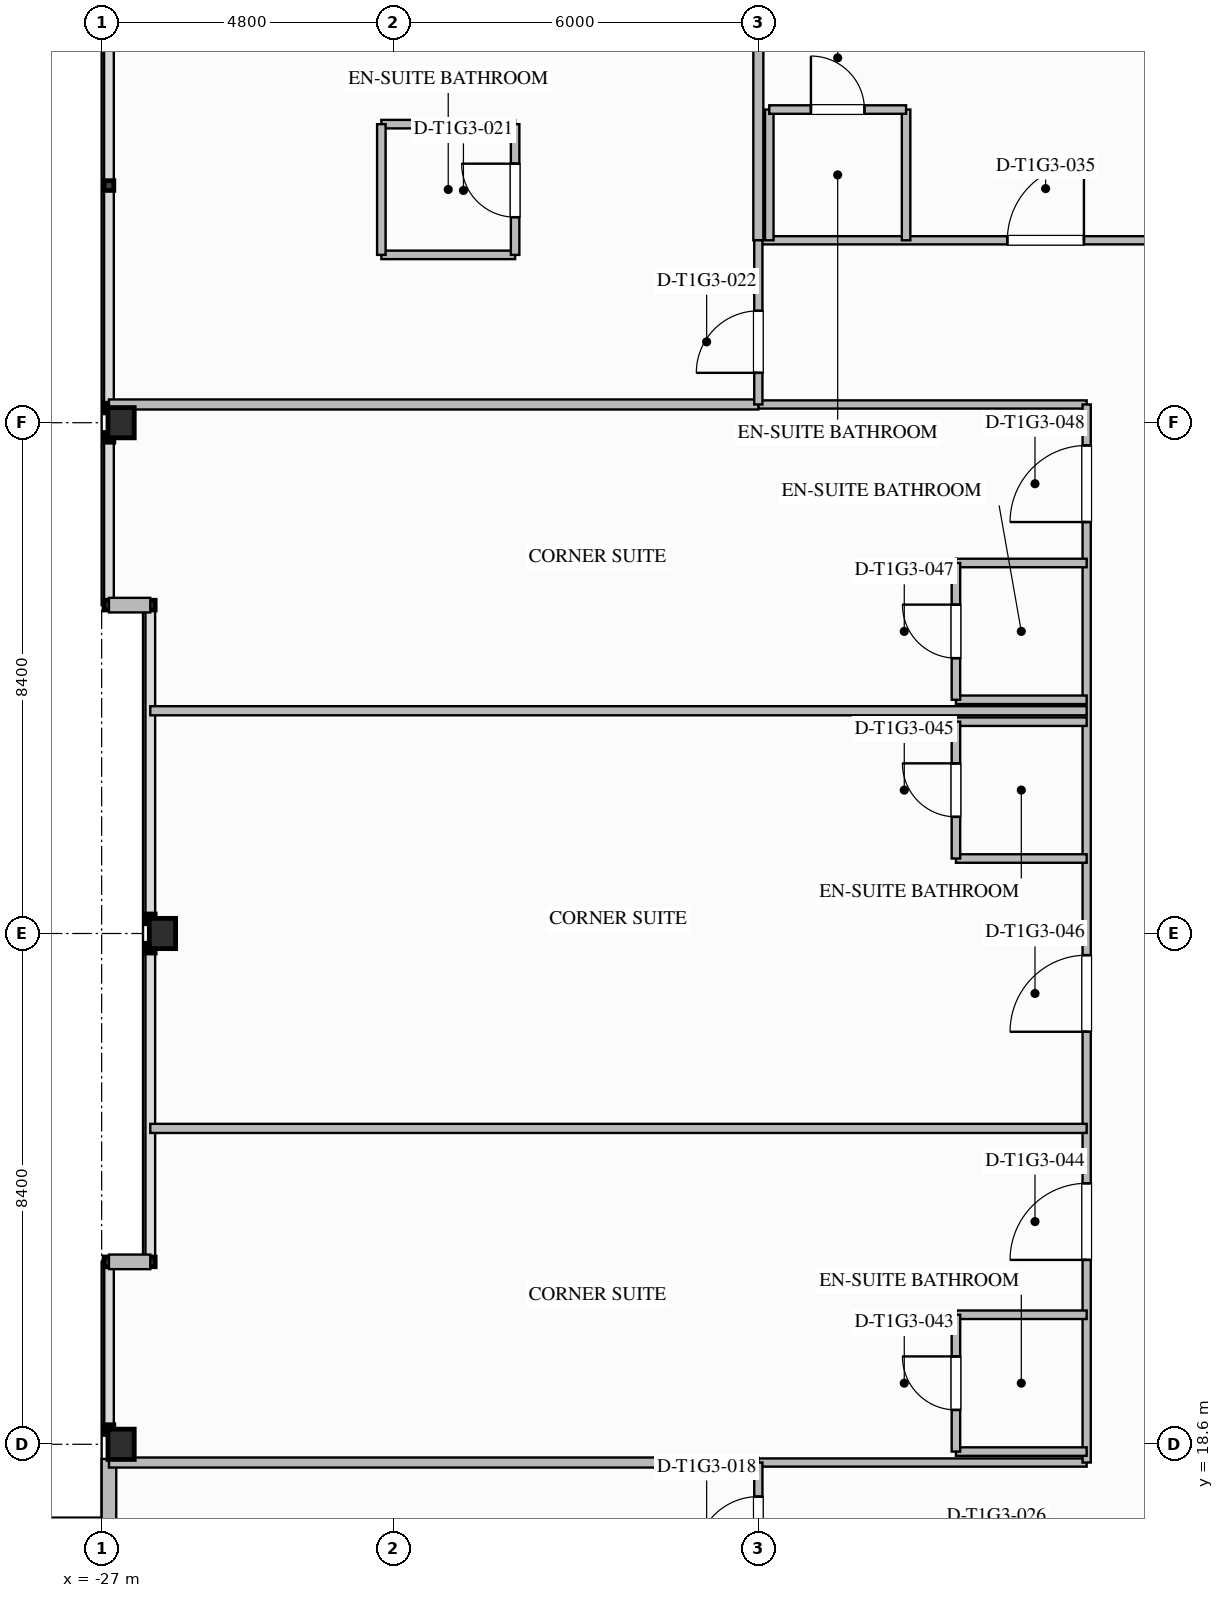
"""IFC4 building model, lengths in metres.
Left out: names, types, materials, properties, quantities, classifications, styles, units other than length and angle.
Written with IfcOpenShell. Run it as: python <this file> out.ifc"""

import sys

from ifc_helpers import new_model, si_unit, direction, frame, frame_2d, origin, origin_2d, place, context, subcontext, project, spatial, rectangle, i_section, extrude, element, fill, save


model = new_model("IFC4")
c1 = context("Model", 3, precision=1e-05, world=origin(), true_north=direction((0.0, 1.0)))
c2 = subcontext(c1, "Body", "Model", "MODEL_VIEW")
j1 = project(units=[si_unit("LENGTHUNIT", "METRE"), si_unit("PLANEANGLEUNIT", "RADIAN")], contexts=[c1])
p1 = place(None, origin())
s1 = spatial("IfcSite", under=j1, at=p1, CompositionType="ELEMENT")
p2 = place(p1, origin())
s2 = spatial("IfcBuilding", under=s1, at=p2, CompositionType="ELEMENT")
p3 = place(p2, frame((0.0, 0.0, 54.2)))
s3 = spatial("IfcBuildingStorey", under=s2, at=p3, CompositionType="ELEMENT", Elevation=54.2)
for number, where, z_axis, x_axis in (
    (1, (-26.68, 18.6, 0.0), (0.0, 0.0, 1.0), (1.0, 0.0, 0.0)),
    (2, (-26.0, 27.0, 0.0), (0.0, 0.0, 1.0), (1.0, 0.0, 0.0)),
    (3, (-26.68, 35.4, 0.0), (0.0, 0.0, 1.0), (1.0, 0.0, 0.0)),
):
    element("IfcColumn", number, at=place(p3, frame(where, z_axis=z_axis, x_axis=x_axis)), inside=s3, PredefinedType="COLUMN", context=c2, shape_type="SweptSolid", body=[
        extrude(i_section(OverallWidth=0.432, OverallDepth=0.498, WebThickness=0.056, FlangeThickness=0.089, FilletRadius=0.03, at=origin_2d()), origin(), (0.0, 0.0, 1.0), 3.497),
    ])
p4 = place(p3, frame((-26.88, 11.041, 0.0), z_axis=(0.0, 0.0, 1.0), x_axis=(0.0, 1.0, 0.0)))
e4 = element("IfcWall", 4, at=p4, inside=s3, PredefinedType="STANDARD", context=c2, shape_type="SweptSolid", body=[
    extrude(rectangle(XDim=7.318, YDim=0.24, at=frame_2d((3.659, 0.0))), origin(), (0.0, 0.0, 1.0), 2.629),
])
p5 = place(p4, frame((4.559, 0.0, 0.0)))
e5 = element("IfcOpeningElement", 5, at=p5, cuts=e4, PredefinedType="OPENING", context=c2, shape_type="SweptSolid", body=[
    extrude(rectangle(XDim=1.0, YDim=2.2, at=frame_2d((0.5, 1.1))), frame((0.0, 0.13, 0.0), z_axis=(0.0, -1.0, 0.0), x_axis=(1.0, 0.0, 0.0)), (0.0, 0.0, 1.0), 0.26),
])
p6 = place(p4, frame((1.552, 0.0, 0.75)))
e6 = element("IfcOpeningElement", 6, at=p6, cuts=e4, PredefinedType="OPENING", context=c2, shape_type="SweptSolid", body=[
    extrude(rectangle(XDim=1.8, YDim=1.779, at=frame_2d((0.9, 0.89))), frame((0.0, 0.13, 0.0), z_axis=(0.0, -1.0, 0.0), x_axis=(1.0, 0.0, 0.0)), (0.0, 0.0, 1.0), 0.26),
])
for number, where, z_axis, x_axis in (
    (7, (-26.88, 21.6, 0.0), (0.0, 0.0, 1.0), (1.0, 0.0, 0.0)),
    (8, (-26.2, 32.4, 0.0), (0.0, 0.0, 1.0), (-1.0, 0.0, 0.0)),
):
    element("IfcWall", number, at=place(p3, frame(where, z_axis=z_axis, x_axis=x_axis)), inside=s3, PredefinedType="STANDARD", context=c2, shape_type="SweptSolid", body=[
        extrude(rectangle(XDim=0.68, YDim=0.24, at=frame_2d((0.34, 0.0))), origin(), (0.0, 0.0, 1.0), 3.24),
    ])
p7 = place(p3, frame((-16.2, 38.4, 0.0), z_axis=(0.0, 0.0, 1.0), x_axis=(1.0, 0.0, 0.0)))
e9 = element("IfcWall", 9, at=p7, inside=s3, PredefinedType="PARTITIONING", context=c2, shape_type="SweptSolid", body=[
    extrude(rectangle(XDim=32.4, YDim=0.135, at=frame_2d((16.2, 0.0))), origin(), (0.0, 0.0, 1.0), 3.24),
])
p8 = place(p7, frame((4.095, 0.0, 0.0)))
e10 = element("IfcOpeningElement", 10, at=p8, cuts=e9, PredefinedType="OPENING", context=c2, shape_type="SweptSolid", body=[
    extrude(rectangle(XDim=1.26, YDim=2.2, at=frame_2d((0.63, 1.1))), frame((0.0, 0.077, 0.0), z_axis=(0.0, -1.0, 0.0), x_axis=(1.0, 0.0, 0.0)), (0.0, 0.0, 1.0), 0.155),
])
p9 = place(p7, frame((7.875, 0.0, 0.0)))
e11 = element("IfcOpeningElement", 11, at=p9, cuts=e9, PredefinedType="OPENING", context=c2, shape_type="SweptSolid", body=[
    extrude(rectangle(XDim=1.26, YDim=2.2, at=frame_2d((0.63, 1.1))), frame((0.0, 0.077, 0.0), z_axis=(0.0, -1.0, 0.0), x_axis=(1.0, 0.0, 0.0)), (0.0, 0.0, 1.0), 0.155),
])
p10 = place(p7, frame((15.69, 0.0, 0.0)))
e12 = element("IfcOpeningElement", 12, at=p10, cuts=e9, PredefinedType="OPENING", context=c2, shape_type="SweptSolid", body=[
    extrude(rectangle(XDim=1.02, YDim=2.15, at=frame_2d((0.51, 1.075))), frame((0.0, 0.077, 0.0), z_axis=(0.0, -1.0, 0.0), x_axis=(1.0, 0.0, 0.0)), (0.0, 0.0, 1.0), 0.155),
])
p11 = place(p7, frame((21.645, 0.0, 0.0)))
e13 = element("IfcOpeningElement", 13, at=p11, cuts=e9, PredefinedType="OPENING", context=c2, shape_type="SweptSolid", body=[
    extrude(rectangle(XDim=1.26, YDim=2.2, at=frame_2d((0.63, 1.1))), frame((0.0, 0.077, 0.0), z_axis=(0.0, -1.0, 0.0), x_axis=(1.0, 0.0, 0.0)), (0.0, 0.0, 1.0), 0.155),
])
p12 = place(p7, frame((30.285, 0.0, 0.0)))
e14 = element("IfcOpeningElement", 14, at=p12, cuts=e9, PredefinedType="OPENING", context=c2, shape_type="SweptSolid", body=[
    extrude(rectangle(XDim=1.26, YDim=2.2, at=frame_2d((0.63, 1.1))), frame((0.0, 0.077, 0.0), z_axis=(0.0, -1.0, 0.0), x_axis=(1.0, 0.0, 0.0)), (0.0, 0.0, 1.0), 0.155),
])
for number, where, z_axis, x_axis in (
    (15, (-16.2, 18.3, 0.0), (0.0, 0.0, 1.0), (1.0, 0.0, 0.0)),
    (16, (-16.2, 35.7, 0.0), (0.0, 0.0, 1.0), (1.0, 0.0, 0.0)),
):
    element("IfcWall", number, at=place(p3, frame(where, z_axis=z_axis, x_axis=x_axis)), inside=s3, PredefinedType="PARTITIONING", context=c2, shape_type="SweptSolid", body=[
        extrude(rectangle(XDim=5.4, YDim=0.135, at=frame_2d((2.7, 0.0))), origin(), (0.0, 0.0, 1.0), 3.24),
    ])
p13 = place(p3, frame((-10.8, 18.3, 0.0), z_axis=(0.0, 0.0, 1.0), x_axis=(0.0, 1.0, 0.0)))
e17 = element("IfcWall", 17, at=p13, inside=s3, PredefinedType="PARTITIONING", context=c2, shape_type="SweptSolid", body=[
    extrude(rectangle(XDim=17.4, YDim=0.135, at=frame_2d((8.7, 0.0))), origin(), (0.0, 0.0, 1.0), 3.24),
])
p14 = place(p13, frame((3.332, 0.0, 0.0)))
e18 = element("IfcOpeningElement", 18, at=p14, cuts=e17, PredefinedType="OPENING", context=c2, shape_type="SweptSolid", body=[
    extrude(rectangle(XDim=1.26, YDim=2.2, at=frame_2d((0.63, 1.1))), frame((0.0, 0.077, 0.0), z_axis=(0.0, -1.0, 0.0), x_axis=(1.0, 0.0, 0.0)), (0.0, 0.0, 1.0), 0.155),
])
p15 = place(p13, frame((7.084, 0.0, 0.0)))
e19 = element("IfcOpeningElement", 19, at=p15, cuts=e17, PredefinedType="OPENING", context=c2, shape_type="SweptSolid", body=[
    extrude(rectangle(XDim=1.26, YDim=2.2, at=frame_2d((0.63, 1.1))), frame((0.0, 0.077, 0.0), z_axis=(0.0, -1.0, 0.0), x_axis=(1.0, 0.0, 0.0)), (0.0, 0.0, 1.0), 0.155),
])
p16 = place(p13, frame((15.467, 0.0, 0.0)))
e20 = element("IfcOpeningElement", 20, at=p16, cuts=e17, PredefinedType="OPENING", context=c2, shape_type="SweptSolid", body=[
    extrude(rectangle(XDim=1.26, YDim=2.2, at=frame_2d((0.63, 1.1))), frame((0.0, 0.077, 0.0), z_axis=(0.0, -1.0, 0.0), x_axis=(1.0, 0.0, 0.0)), (0.0, 0.0, 1.0), 0.155),
])
p17 = place(p3, frame((-16.2, 38.4, 0.0), z_axis=(0.0, 0.0, 1.0), x_axis=(0.0, 1.0, 0.0)))
e21 = element("IfcWall", 21, at=p17, inside=s3, PredefinedType="PARTITIONING", context=c2, shape_type="SweptSolid", body=[
    extrude(rectangle(XDim=15.48, YDim=0.165, at=frame_2d((7.74, 0.0))), origin(), (0.0, 0.0, 1.0), 2.298),
])
for number, where, z_axis, x_axis in (
    (22, (-26.88, 18.3, 0.0), (0.0, 0.0, 1.0), (1.0, 0.0, 0.0)),
    (23, (-26.88, 35.7, 0.0), (0.0, 0.0, 1.0), (1.0, 0.0, 0.0)),
):
    element("IfcWall", number, at=place(p3, frame(where, z_axis=z_axis, x_axis=x_axis)), inside=s3, PredefinedType="PARTITIONING", context=c2, shape_type="SweptSolid", body=[
        extrude(rectangle(XDim=10.68, YDim=0.165, at=frame_2d((5.34, 0.0))), origin(), (0.0, 0.0, 1.0), 2.298),
    ])
p18 = place(p3, frame((-16.2, 16.2, 0.0), z_axis=(0.0, 0.0, 1.0), x_axis=(0.0, 1.0, 0.0)))
e24 = element("IfcWall", 24, at=p18, inside=s3, PredefinedType="PARTITIONING", context=c2, shape_type="SweptSolid", body=[
    extrude(rectangle(XDim=2.1, YDim=0.135, at=frame_2d((1.05, 0.0))), origin(), (0.0, 0.0, 1.0), 2.298),
])
p19 = place(p18, frame((0.52, 0.0, 0.0)))
e25 = element("IfcOpeningElement", 25, at=p19, cuts=e24, PredefinedType="OPENING", context=c2, shape_type="SweptSolid", body=[
    extrude(rectangle(XDim=1.02, YDim=2.15, at=frame_2d((0.51, 1.075))), frame((0.0, 0.077, 0.0), z_axis=(0.0, -1.0, 0.0), x_axis=(1.0, 0.0, 0.0)), (0.0, 0.0, 1.0), 0.155),
])
p20 = place(p3, frame((-16.2, 35.7, 0.0), z_axis=(0.0, 0.0, 1.0), x_axis=(0.0, 1.0, 0.0)))
e26 = element("IfcWall", 26, at=p20, inside=s3, PredefinedType="PARTITIONING", context=c2, shape_type="SweptSolid", body=[
    extrude(rectangle(XDim=2.7, YDim=0.135, at=frame_2d((1.35, 0.0))), origin(), (0.0, 0.0, 1.0), 2.298),
])
p21 = place(p20, frame((0.52, 0.0, 0.0)))
e27 = element("IfcOpeningElement", 27, at=p21, cuts=e26, PredefinedType="OPENING", context=c2, shape_type="SweptSolid", body=[
    extrude(rectangle(XDim=1.02, YDim=2.15, at=frame_2d((0.51, 1.075))), frame((0.0, 0.077, 0.0), z_axis=(0.0, -1.0, 0.0), x_axis=(1.0, 0.0, 0.0)), (0.0, 0.0, 1.0), 0.155),
])
for number, where, z_axis, x_axis in (
    (28, (-22.4, 38.16, 0.0), (0.0, 0.0, 1.0), (1.0, 0.0, 0.0)),
    (29, (-22.4, 40.31, 0.0), (0.0, 0.0, 1.0), (1.0, 0.0, 0.0)),
):
    element("IfcWall", number, at=place(p3, frame(where, z_axis=z_axis, x_axis=x_axis)), inside=s3, PredefinedType="PLUMBINGWALL", context=c2, shape_type="SweptSolid", body=[
        extrude(rectangle(XDim=2.2, YDim=0.14, at=frame_2d((1.1, 0.0))), origin(), (0.0, 0.0, 1.0), 3.24),
    ])
p22 = place(p3, frame((-22.4, 38.16, 0.0), z_axis=(0.0, 0.0, 1.0), x_axis=(0.0, 1.0, 0.0)))
e30 = element("IfcWall", 30, at=p22, inside=s3, PredefinedType="PLUMBINGWALL", context=c2, shape_type="SweptSolid", body=[
    extrude(rectangle(XDim=2.15, YDim=0.14, at=frame_2d((1.075, 0.0))), origin(), (0.0, 0.0, 1.0), 3.24),
])
p23 = place(p3, frame((-20.2, 38.16, 0.0), z_axis=(0.0, 0.0, 1.0), x_axis=(0.0, 1.0, 0.0)))
e31 = element("IfcWall", 31, at=p23, inside=s3, PredefinedType="PLUMBINGWALL", context=c2, shape_type="SweptSolid", body=[
    extrude(rectangle(XDim=2.15, YDim=0.14, at=frame_2d((1.075, 0.0))), origin(), (0.0, 0.0, 1.0), 3.24),
])
p24 = place(p23, frame((0.62, 0.0, 0.0)))
e32 = element("IfcOpeningElement", 32, at=p24, cuts=e31, PredefinedType="OPENING", context=c2, shape_type="SweptSolid", body=[
    extrude(rectangle(XDim=0.88, YDim=2.1, at=frame_2d((0.44, 1.05))), frame((0.0, 0.08, 0.0), z_axis=(0.0, -1.0, 0.0), x_axis=(1.0, 0.0, 0.0)), (0.0, 0.0, 1.0), 0.16),
])
p25 = place(p3, frame((-16.02, 38.4, 0.0), z_axis=(0.0, 0.0, 1.0), x_axis=(0.0, 1.0, 0.0)))
e33 = element("IfcWall", 33, at=p25, inside=s3, PredefinedType="PLUMBINGWALL", context=c2, shape_type="SweptSolid", body=[
    extrude(rectangle(XDim=2.15, YDim=0.14, at=frame_2d((1.075, 0.0))), origin(), (0.0, 0.0, 1.0), 2.298),
])
p26 = place(p3, frame((-13.77, 38.4, 0.0), z_axis=(0.0, 0.0, 1.0), x_axis=(0.0, 1.0, 0.0)))
e34 = element("IfcWall", 34, at=p26, inside=s3, PredefinedType="PLUMBINGWALL", context=c2, shape_type="SweptSolid", body=[
    extrude(rectangle(XDim=2.15, YDim=0.14, at=frame_2d((1.075, 0.0))), origin(), (0.0, 0.0, 1.0), 3.24),
])
p27 = place(p3, frame((-16.02, 40.55, 0.0), z_axis=(0.0, 0.0, 1.0), x_axis=(1.0, 0.0, 0.0)))
e35 = element("IfcWall", 35, at=p27, inside=s3, PredefinedType="PLUMBINGWALL", context=c2, shape_type="SweptSolid", body=[
    extrude(rectangle(XDim=2.25, YDim=0.14, at=frame_2d((1.125, 0.0))), origin(), (0.0, 0.0, 1.0), 3.24),
])
p28 = place(p27, frame((0.685, 0.0, 0.0)))
e36 = element("IfcOpeningElement", 36, at=p28, cuts=e35, PredefinedType="OPENING", context=c2, shape_type="SweptSolid", body=[
    extrude(rectangle(XDim=0.88, YDim=2.1, at=frame_2d((0.44, 1.05))), frame((0.0, 0.08, 0.0), z_axis=(0.0, -1.0, 0.0), x_axis=(1.0, 0.0, 0.0)), (0.0, 0.0, 1.0), 0.16),
])
p29 = place(p3, frame((-10.8, 18.48, 0.0), z_axis=(0.0, 0.0, 1.0), x_axis=(-1.0, 0.0, 0.0)))
e37 = element("IfcWall", 37, at=p29, inside=s3, PredefinedType="PLUMBINGWALL", context=c2, shape_type="SweptSolid", body=[
    extrude(rectangle(XDim=2.15, YDim=0.14, at=frame_2d((1.075, 0.0))), origin(), (0.0, 0.0, 1.0), 2.617),
])
p30 = place(p3, frame((-10.8, 20.73, 0.0), z_axis=(0.0, 0.0, 1.0), x_axis=(-1.0, 0.0, 0.0)))
e38 = element("IfcWall", 38, at=p30, inside=s3, PredefinedType="PLUMBINGWALL", context=c2, shape_type="SweptSolid", body=[
    extrude(rectangle(XDim=2.15, YDim=0.14, at=frame_2d((1.075, 0.0))), origin(), (0.0, 0.0, 1.0), 3.24),
])
p31 = place(p3, frame((-12.95, 18.48, 0.0), z_axis=(0.0, 0.0, 1.0), x_axis=(0.0, 1.0, 0.0)))
e39 = element("IfcWall", 39, at=p31, inside=s3, PredefinedType="PLUMBINGWALL", context=c2, shape_type="SweptSolid", body=[
    extrude(rectangle(XDim=2.25, YDim=0.14, at=frame_2d((1.125, 0.0))), origin(), (0.0, 0.0, 1.0), 3.24),
])
p32 = place(p31, frame((0.685, 0.0, 0.0)))
e40 = element("IfcOpeningElement", 40, at=p32, cuts=e39, PredefinedType="OPENING", context=c2, shape_type="SweptSolid", body=[
    extrude(rectangle(XDim=0.88, YDim=2.1, at=frame_2d((0.44, 1.05))), frame((0.0, 0.08, 0.0), z_axis=(0.0, -1.0, 0.0), x_axis=(1.0, 0.0, 0.0)), (0.0, 0.0, 1.0), 0.16),
])
p33 = place(p3, frame((-26.2, 23.795, 0.0), z_axis=(0.0, 0.0, 1.0), x_axis=(1.0, 0.0, 0.0)))
e41 = element("IfcWall", 41, at=p33, inside=s3, PredefinedType="PARTITIONING", context=c2, shape_type="SweptSolid", body=[
    extrude(rectangle(XDim=15.4, YDim=0.15, at=frame_2d((7.7, 0.0))), origin(), (0.0, 0.0, 1.0), 3.24),
])
for number, where, z_axis, x_axis in (
    (42, (-10.8, 28.233, 0.0), (0.0, 0.0, 1.0), (-1.0, 0.0, 0.0)),
    (43, (-10.8, 30.483, 0.0), (0.0, 0.0, 1.0), (-1.0, 0.0, 0.0)),
):
    element("IfcWall", number, at=place(p3, frame(where, z_axis=z_axis, x_axis=x_axis)), inside=s3, PredefinedType="PLUMBINGWALL", context=c2, shape_type="SweptSolid", body=[
        extrude(rectangle(XDim=2.15, YDim=0.14, at=frame_2d((1.075, 0.0))), origin(), (0.0, 0.0, 1.0), 3.24),
    ])
p34 = place(p3, frame((-12.95, 28.233, 0.0), z_axis=(0.0, 0.0, 1.0), x_axis=(0.0, 1.0, 0.0)))
e44 = element("IfcWall", 44, at=p34, inside=s3, PredefinedType="PLUMBINGWALL", context=c2, shape_type="SweptSolid", body=[
    extrude(rectangle(XDim=2.25, YDim=0.14, at=frame_2d((1.125, 0.0))), origin(), (0.0, 0.0, 1.0), 3.24),
])
p35 = place(p34, frame((0.685, 0.0, 0.0)))
e45 = element("IfcOpeningElement", 45, at=p35, cuts=e44, PredefinedType="OPENING", context=c2, shape_type="SweptSolid", body=[
    extrude(rectangle(XDim=0.88, YDim=2.1, at=frame_2d((0.44, 1.05))), frame((0.0, 0.08, 0.0), z_axis=(0.0, -1.0, 0.0), x_axis=(1.0, 0.0, 0.0)), (0.0, 0.0, 1.0), 0.16),
])
p36 = place(p3, frame((-26.2, 30.663, 0.0), z_axis=(0.0, 0.0, 1.0), x_axis=(1.0, 0.0, 0.0)))
e46 = element("IfcWall", 46, at=p36, inside=s3, PredefinedType="PARTITIONING", context=c2, shape_type="SweptSolid", body=[
    extrude(rectangle(XDim=15.4, YDim=0.15, at=frame_2d((7.7, 0.0))), origin(), (0.0, 0.0, 1.0), 3.24),
])
for number, where, z_axis, x_axis in (
    (47, (-10.8, 30.843, 0.0), (0.0, 0.0, 1.0), (-1.0, 0.0, 0.0)),
    (48, (-10.8, 33.093, 0.0), (0.0, 0.0, 1.0), (-1.0, 0.0, 0.0)),
):
    element("IfcWall", number, at=place(p3, frame(where, z_axis=z_axis, x_axis=x_axis)), inside=s3, PredefinedType="PLUMBINGWALL", context=c2, shape_type="SweptSolid", body=[
        extrude(rectangle(XDim=2.15, YDim=0.14, at=frame_2d((1.075, 0.0))), origin(), (0.0, 0.0, 1.0), 3.24),
    ])
p37 = place(p3, frame((-12.95, 30.843, 0.0), z_axis=(0.0, 0.0, 1.0), x_axis=(0.0, 1.0, 0.0)))
e49 = element("IfcWall", 49, at=p37, inside=s3, PredefinedType="PLUMBINGWALL", context=c2, shape_type="SweptSolid", body=[
    extrude(rectangle(XDim=2.25, YDim=0.14, at=frame_2d((1.125, 0.0))), origin(), (0.0, 0.0, 1.0), 3.24),
])
p38 = place(p37, frame((0.685, 0.0, 0.0)))
e50 = element("IfcOpeningElement", 50, at=p38, cuts=e49, PredefinedType="OPENING", context=c2, shape_type="SweptSolid", body=[
    extrude(rectangle(XDim=0.88, YDim=2.1, at=frame_2d((0.44, 1.05))), frame((0.0, 0.08, 0.0), z_axis=(0.0, -1.0, 0.0), x_axis=(1.0, 0.0, 0.0)), (0.0, 0.0, 1.0), 0.16),
])
p39 = place(p19, origin())
e51 = element("IfcDoor", 51, at=p39, inside=s3, OperationType="SINGLE_SWING_LEFT", PredefinedType="DOOR", context=c2, shape_type="SweptSolid", body=[
    extrude(rectangle(XDim=1.02, YDim=2.15, at=frame_2d((0.51, 1.075))), frame((0.0, 0.025, 0.0), z_axis=(0.0, -1.0, 0.0), x_axis=(1.0, 0.0, 0.0)), (0.0, 0.0, 1.0), 0.05),
])
fill(e25, e51)
p40 = place(p24, origin())
e52 = element("IfcDoor", 52, at=p40, inside=s3, OperationType="SINGLE_SWING_RIGHT", PredefinedType="DOOR", context=c2, shape_type="SweptSolid", body=[
    extrude(rectangle(XDim=0.88, YDim=2.1, at=frame_2d((0.44, 1.05))), frame((0.0, 0.025, 0.0), z_axis=(0.0, -1.0, 0.0), x_axis=(1.0, 0.0, 0.0)), (0.0, 0.0, 1.0), 0.05),
])
fill(e32, e52)
p41 = place(p21, origin())
e53 = element("IfcDoor", 53, at=p41, inside=s3, OperationType="SINGLE_SWING_LEFT", PredefinedType="DOOR", context=c2, shape_type="SweptSolid", body=[
    extrude(rectangle(XDim=1.02, YDim=2.15, at=frame_2d((0.51, 1.075))), frame((0.0, 0.025, 0.0), z_axis=(0.0, -1.0, 0.0), x_axis=(1.0, 0.0, 0.0)), (0.0, 0.0, 1.0), 0.05),
])
fill(e27, e53)
p42 = place(p28, origin())
e54 = element("IfcDoor", 54, at=p42, inside=s3, OperationType="SINGLE_SWING_LEFT", PredefinedType="DOOR", context=c2, shape_type="SweptSolid", body=[
    extrude(rectangle(XDim=0.88, YDim=2.1, at=frame_2d((0.44, 1.05))), frame((0.0, 0.025, 0.0), z_axis=(0.0, -1.0, 0.0), x_axis=(1.0, 0.0, 0.0)), (0.0, 0.0, 1.0), 0.05),
])
fill(e36, e54)
p43 = place(p8, origin())
e55 = element("IfcDoor", 55, at=p43, inside=s3, OperationType="SINGLE_SWING_RIGHT", PredefinedType="DOOR", context=c2, shape_type="SweptSolid", body=[
    extrude(rectangle(XDim=1.26, YDim=2.2, at=frame_2d((0.63, 1.1))), frame((0.0, 0.025, 0.0), z_axis=(0.0, -1.0, 0.0), x_axis=(1.0, 0.0, 0.0)), (0.0, 0.0, 1.0), 0.05),
])
fill(e10, e55)
p44 = place(p32, origin())
e56 = element("IfcDoor", 56, at=p44, inside=s3, OperationType="SINGLE_SWING_RIGHT", PredefinedType="DOOR", context=c2, shape_type="SweptSolid", body=[
    extrude(rectangle(XDim=0.88, YDim=2.1, at=frame_2d((0.44, 1.05))), frame((0.0, 0.025, 0.0), z_axis=(0.0, -1.0, 0.0), x_axis=(1.0, 0.0, 0.0)), (0.0, 0.0, 1.0), 0.05),
])
fill(e40, e56)
p45 = place(p14, origin())
e57 = element("IfcDoor", 57, at=p45, inside=s3, OperationType="SINGLE_SWING_LEFT", PredefinedType="DOOR", context=c2, shape_type="SweptSolid", body=[
    extrude(rectangle(XDim=1.26, YDim=2.2, at=frame_2d((0.63, 1.1))), frame((0.0, 0.025, 0.0), z_axis=(0.0, -1.0, 0.0), x_axis=(1.0, 0.0, 0.0)), (0.0, 0.0, 1.0), 0.05),
])
fill(e18, e57)
p46 = place(p35, origin())
e58 = element("IfcDoor", 58, at=p46, inside=s3, OperationType="SINGLE_SWING_RIGHT", PredefinedType="DOOR", context=c2, shape_type="SweptSolid", body=[
    extrude(rectangle(XDim=0.88, YDim=2.1, at=frame_2d((0.44, 1.05))), frame((0.0, 0.025, 0.0), z_axis=(0.0, -1.0, 0.0), x_axis=(1.0, 0.0, 0.0)), (0.0, 0.0, 1.0), 0.05),
])
fill(e45, e58)
p47 = place(p15, origin())
e59 = element("IfcDoor", 59, at=p47, inside=s3, OperationType="SINGLE_SWING_LEFT", PredefinedType="DOOR", context=c2, shape_type="SweptSolid", body=[
    extrude(rectangle(XDim=1.26, YDim=2.2, at=frame_2d((0.63, 1.1))), frame((0.0, 0.025, 0.0), z_axis=(0.0, -1.0, 0.0), x_axis=(1.0, 0.0, 0.0)), (0.0, 0.0, 1.0), 0.05),
])
fill(e19, e59)
p48 = place(p38, origin())
e60 = element("IfcDoor", 60, at=p48, inside=s3, OperationType="SINGLE_SWING_RIGHT", PredefinedType="DOOR", context=c2, shape_type="SweptSolid", body=[
    extrude(rectangle(XDim=0.88, YDim=2.1, at=frame_2d((0.44, 1.05))), frame((0.0, 0.025, 0.0), z_axis=(0.0, -1.0, 0.0), x_axis=(1.0, 0.0, 0.0)), (0.0, 0.0, 1.0), 0.05),
])
fill(e50, e60)
p49 = place(p16, origin())
e61 = element("IfcDoor", 61, at=p49, inside=s3, OperationType="SINGLE_SWING_LEFT", PredefinedType="DOOR", context=c2, shape_type="SweptSolid", body=[
    extrude(rectangle(XDim=1.26, YDim=2.2, at=frame_2d((0.63, 1.1))), frame((0.0, 0.025, 0.0), z_axis=(0.0, -1.0, 0.0), x_axis=(1.0, 0.0, 0.0)), (0.0, 0.0, 1.0), 0.05),
])
fill(e20, e61)
save(model, sys.argv[1])
